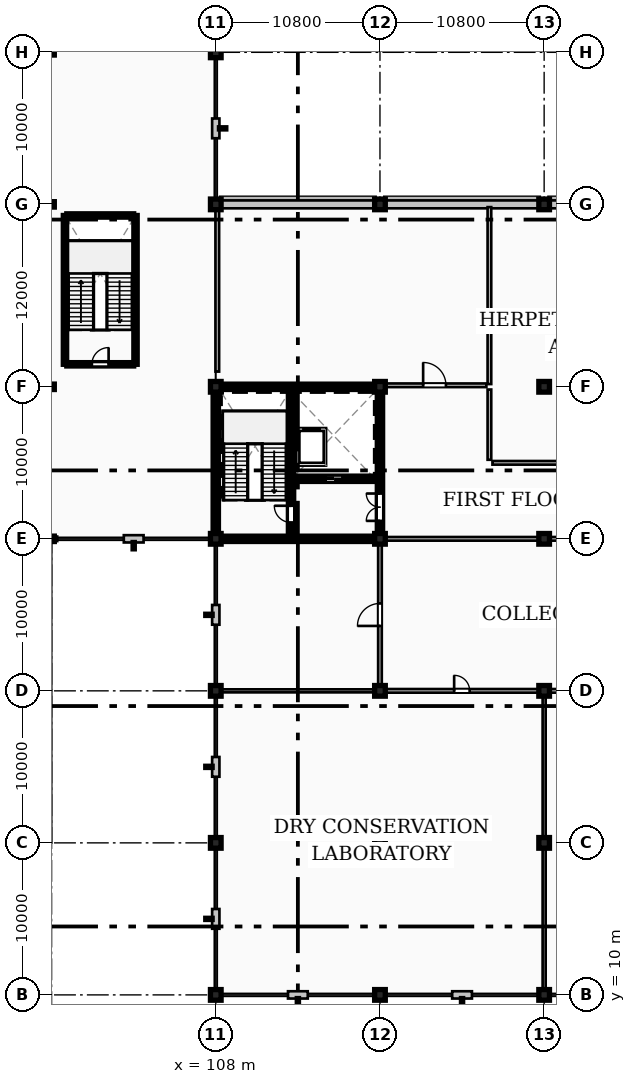
"""IFC4 building model, lengths in metres.
Left out: names, types, materials, properties, quantities, classifications, styles, units other than length and angle.
Written with IfcOpenShell. Run it as: python <this file> out.ifc"""

import sys

from ifc_helpers import new_model, si_unit, direction, frame, frame_2d, origin, origin_2d, place, context, subcontext, project, spatial, rectangle, hollow_circle, extrude, element, fill, save


model = new_model("IFC4")
c1 = context("Model", 3, precision=1e-05, world=origin(), true_north=direction((0.0, 1.0)))
c2 = subcontext(c1, "Body", "Model", "MODEL_VIEW")
j1 = project(units=[si_unit("LENGTHUNIT", "METRE"), si_unit("PLANEANGLEUNIT", "RADIAN")], contexts=[c1])
p1 = place(None, origin())
s1 = spatial("IfcSite", under=j1, at=p1, CompositionType="ELEMENT")
p2 = place(p1, origin())
s2 = spatial("IfcBuilding", under=s1, at=p2, CompositionType="ELEMENT")
p3 = place(p2, frame((0.0, 0.0, 4.8)))
s3 = spatial("IfcBuildingStorey", under=s2, at=p3, CompositionType="ELEMENT", Elevation=4.8)
for number, where, z_axis, x_axis in (
    (1, (97.2, 40.0, 0.0), (0.0, 0.0, 1.0), (1.0, 0.0, 0.0)),
    (2, (97.2, 50.0, 0.0), (0.0, 0.0, 1.0), (1.0, 0.0, 0.0)),
    (3, (97.2, 62.0, 0.0), (0.0, 0.0, 1.0), (1.0, 0.0, 0.0)),
    (4, (97.2, 72.0, 0.0), (0.0, 0.0, 1.0), (1.0, 0.0, 0.0)),
):
    element("IfcColumn", number, at=place(p3, frame(where, z_axis=z_axis, x_axis=x_axis)), inside=s3, PredefinedType="COLUMN", context=c2, shape_type="SweptSolid", body=[
        extrude(hollow_circle(Radius=0.178, WallThickness=0.016, at=origin_2d()), origin(), (0.0, 0.0, 1.0), 4.8),
    ])
for number, where, z_axis, x_axis in (
    (5, (108.0, 10.0, 0.0), (0.0, 0.0, 1.0), (1.0, 0.0, 0.0)),
    (6, (108.0, 20.0, 0.0), (0.0, 0.0, 1.0), (1.0, 0.0, 0.0)),
    (7, (108.0, 30.0, 0.0), (0.0, 0.0, 1.0), (1.0, 0.0, 0.0)),
    (8, (108.0, 40.0, 0.0), (0.0, 0.0, 1.0), (1.0, 0.0, 0.0)),
    (9, (108.0, 50.0, 0.0), (0.0, 0.0, 1.0), (1.0, 0.0, 0.0)),
    (10, (108.0, 62.0, 0.0), (0.0, 0.0, 1.0), (1.0, 0.0, 0.0)),
    (11, (108.0, 72.0, 0.0), (0.0, 0.0, 1.0), (1.0, 0.0, 0.0)),
    (12, (118.8, 10.0, 0.0), (0.0, 0.0, 1.0), (1.0, 0.0, 0.0)),
    (13, (118.8, 20.0, 0.0), (0.0, 0.0, 1.0), (1.0, 0.0, 0.0)),
    (14, (118.8, 30.0, 0.0), (0.0, 0.0, 1.0), (1.0, 0.0, 0.0)),
    (15, (118.8, 40.0, 0.0), (0.0, 0.0, 1.0), (1.0, 0.0, 0.0)),
    (16, (118.8, 50.0, 0.0), (0.0, 0.0, 1.0), (1.0, 0.0, 0.0)),
    (17, (118.8, 62.0, 0.0), (0.0, 0.0, 1.0), (1.0, 0.0, 0.0)),
    (18, (129.6, 10.0, 0.0), (0.0, 0.0, 1.0), (1.0, 0.0, 0.0)),
    (19, (129.6, 20.0, 0.0), (0.0, 0.0, 1.0), (1.0, 0.0, 0.0)),
    (20, (129.6, 30.0, 0.0), (0.0, 0.0, 1.0), (1.0, 0.0, 0.0)),
    (21, (129.6, 40.0, 0.0), (0.0, 0.0, 1.0), (1.0, 0.0, 0.0)),
    (22, (129.6, 50.0, 0.0), (0.0, 0.0, 1.0), (1.0, 0.0, 0.0)),
    (23, (129.6, 62.0, 0.0), (0.0, 0.0, 1.0), (1.0, 0.0, 0.0)),
):
    element("IfcColumn", number, at=place(p3, frame(where, z_axis=z_axis, x_axis=x_axis)), inside=s3, PredefinedType="COLUMN", context=c2, shape_type="SweptSolid", body=[
        extrude(rectangle(XDim=0.7, YDim=0.7, at=origin_2d()), origin(), (0.0, 0.0, 1.0), 4.8),
    ])
p4 = place(p3, frame((101.95, 40.0, 0.0), z_axis=(0.0, 0.0, 1.0), x_axis=(1.0, 0.0, 0.0)))
e24 = element("IfcWall", 24, at=p4, inside=s3, PredefinedType="STANDARD", context=c2, shape_type="SweptSolid", body=[
    extrude(rectangle(XDim=1.3, YDim=0.48, at=frame_2d((0.65, 0.0))), origin(), (0.0, 0.0, 1.0), 4.06),
])
for number, where, z_axis, x_axis in (
    (25, (97.345, 40.0, 0.0), (0.0, 0.0, 1.0), (1.0, 0.0, 0.0)),
    (26, (107.63, 40.0, 0.0), (0.0, 0.0, 1.0), (1.0, 0.0, 0.0)),
):
    element("IfcWall", number, at=place(p3, frame(where, z_axis=z_axis, x_axis=x_axis)), inside=s3, PredefinedType="STANDARD", context=c2, shape_type="SweptSolid", body=[
        extrude(rectangle(XDim=0.225, YDim=0.3, at=frame_2d((0.113, 0.0))), origin(), (0.0, 0.0, 1.0), 4.56),
    ])
p5 = place(p3, frame((108.0, 35.65, 0.0), z_axis=(0.0, 0.0, 1.0), x_axis=(0.0, -1.0, 0.0)))
e27 = element("IfcWall", 27, at=p5, inside=s3, PredefinedType="STANDARD", context=c2, shape_type="SweptSolid", body=[
    extrude(rectangle(XDim=1.3, YDim=0.48, at=frame_2d((0.65, 0.0))), origin(), (0.0, 0.0, 1.0), 4.56),
])
for number, where, z_axis, x_axis in (
    (28, (108.0, 39.855, 0.0), (0.0, 0.0, 1.0), (0.0, -1.0, 0.0)),
    (29, (108.0, 30.37, 0.0), (0.0, 0.0, 1.0), (0.0, -1.0, 0.0)),
):
    element("IfcWall", number, at=place(p3, frame(where, z_axis=z_axis, x_axis=x_axis)), inside=s3, PredefinedType="STANDARD", context=c2, shape_type="SweptSolid", body=[
        extrude(rectangle(XDim=0.225, YDim=0.3, at=frame_2d((0.113, 0.0))), origin(), (0.0, 0.0, 1.0), 4.56),
    ])
p6 = place(p3, frame((108.0, 25.65, 0.0), z_axis=(0.0, 0.0, 1.0), x_axis=(0.0, -1.0, 0.0)))
e30 = element("IfcWall", 30, at=p6, inside=s3, PredefinedType="STANDARD", context=c2, shape_type="SweptSolid", body=[
    extrude(rectangle(XDim=1.3, YDim=0.48, at=frame_2d((0.65, 0.0))), origin(), (0.0, 0.0, 1.0), 4.56),
])
for number, where, z_axis, x_axis in (
    (31, (108.0, 29.855, 0.0), (0.0, 0.0, 1.0), (0.0, -1.0, 0.0)),
    (32, (108.0, 20.37, 0.0), (0.0, 0.0, 1.0), (0.0, -1.0, 0.0)),
):
    element("IfcWall", number, at=place(p3, frame(where, z_axis=z_axis, x_axis=x_axis)), inside=s3, PredefinedType="STANDARD", context=c2, shape_type="SweptSolid", body=[
        extrude(rectangle(XDim=0.225, YDim=0.3, at=frame_2d((0.113, 0.0))), origin(), (0.0, 0.0, 1.0), 4.56),
    ])
p7 = place(p3, frame((108.0, 15.65, 0.0), z_axis=(0.0, 0.0, 1.0), x_axis=(0.0, -1.0, 0.0)))
e33 = element("IfcWall", 33, at=p7, inside=s3, PredefinedType="STANDARD", context=c2, shape_type="SweptSolid", body=[
    extrude(rectangle(XDim=1.3, YDim=0.48, at=frame_2d((0.65, 0.0))), origin(), (0.0, 0.0, 1.0), 4.13),
])
for number, where, z_axis, x_axis in (
    (34, (108.0, 19.855, 0.0), (0.0, 0.0, 1.0), (0.0, -1.0, 0.0)),
    (35, (108.0, 10.37, 0.0), (0.0, 0.0, 1.0), (0.0, -1.0, 0.0)),
):
    element("IfcWall", number, at=place(p3, frame(where, z_axis=z_axis, x_axis=x_axis)), inside=s3, PredefinedType="STANDARD", context=c2, shape_type="SweptSolid", body=[
        extrude(rectangle(XDim=0.225, YDim=0.3, at=frame_2d((0.113, 0.0))), origin(), (0.0, 0.0, 1.0), 4.56),
    ])
p8 = place(p3, frame((112.75, 10.0, 0.0), z_axis=(0.0, 0.0, 1.0), x_axis=(1.0, 0.0, 0.0)))
e36 = element("IfcWall", 36, at=p8, inside=s3, PredefinedType="STANDARD", context=c2, shape_type="SweptSolid", body=[
    extrude(rectangle(XDim=1.3, YDim=0.48, at=frame_2d((0.65, 0.0))), origin(), (0.0, 0.0, 1.0), 4.13),
])
for number, where, z_axis, x_axis in (
    (37, (108.145, 10.0, 0.0), (0.0, 0.0, 1.0), (1.0, 0.0, 0.0)),
    (38, (118.43, 10.0, 0.0), (0.0, 0.0, 1.0), (1.0, 0.0, 0.0)),
):
    element("IfcWall", number, at=place(p3, frame(where, z_axis=z_axis, x_axis=x_axis)), inside=s3, PredefinedType="STANDARD", context=c2, shape_type="SweptSolid", body=[
        extrude(rectangle(XDim=0.225, YDim=0.3, at=frame_2d((0.113, 0.0))), origin(), (0.0, 0.0, 1.0), 4.56),
    ])
p9 = place(p3, frame((123.55, 10.0, 0.0), z_axis=(0.0, 0.0, 1.0), x_axis=(1.0, 0.0, 0.0)))
e39 = element("IfcWall", 39, at=p9, inside=s3, PredefinedType="STANDARD", context=c2, shape_type="SweptSolid", body=[
    extrude(rectangle(XDim=1.3, YDim=0.48, at=frame_2d((0.65, 0.0))), origin(), (0.0, 0.0, 1.0), 4.13),
])
p10 = place(p3, frame((118.945, 10.0, 0.0), z_axis=(0.0, 0.0, 1.0), x_axis=(1.0, 0.0, 0.0)))
e40 = element("IfcWall", 40, at=p10, inside=s3, PredefinedType="STANDARD", context=c2, shape_type="SweptSolid", body=[
    extrude(rectangle(XDim=0.225, YDim=0.3, at=frame_2d((0.112, 0.0))), origin(), (0.0, 0.0, 1.0), 4.56),
])
p11 = place(p3, frame((129.23, 10.0, 0.0), z_axis=(0.0, 0.0, 1.0), x_axis=(1.0, 0.0, 0.0)))
e41 = element("IfcWall", 41, at=p11, inside=s3, PredefinedType="STANDARD", context=c2, shape_type="SweptSolid", body=[
    extrude(rectangle(XDim=0.225, YDim=0.3, at=frame_2d((0.113, 0.0))), origin(), (0.0, 0.0, 1.0), 4.56),
])
p12 = place(p3, frame((129.745, 10.0, 0.0), z_axis=(0.0, 0.0, 1.0), x_axis=(1.0, 0.0, 0.0)))
e42 = element("IfcWall", 42, at=p12, inside=s3, PredefinedType="STANDARD", context=c2, shape_type="SweptSolid", body=[
    extrude(rectangle(XDim=0.225, YDim=0.3, at=frame_2d((0.112, 0.0))), origin(), (0.0, 0.0, 1.0), 4.56),
])
p13 = place(p3, frame((140.255, 62.0, 0.0), z_axis=(0.0, 0.0, 1.0), x_axis=(-1.0, 0.0, 0.0)))
e43 = element("IfcWall", 43, at=p13, inside=s3, PredefinedType="SOLIDWALL", context=c2, shape_type="SweptSolid", body=[
    extrude(rectangle(XDim=10.51, YDim=0.52, at=frame_2d((5.255, 0.0))), origin(), (0.0, 0.0, 1.0), 3.83),
])
for number, where, z_axis, x_axis in (
    (44, (129.455, 62.0, 0.0), (0.0, 0.0, 1.0), (-1.0, 0.0, 0.0)),
    (45, (118.655, 62.0, 0.0), (0.0, 0.0, 1.0), (-1.0, 0.0, 0.0)),
):
    element("IfcWall", number, at=place(p3, frame(where, z_axis=z_axis, x_axis=x_axis)), inside=s3, PredefinedType="SOLIDWALL", context=c2, shape_type="SweptSolid", body=[
        extrude(rectangle(XDim=10.51, YDim=0.52, at=frame_2d((5.255, 0.0))), origin(), (0.0, 0.0, 1.0), 3.83),
    ])
p14 = place(p3, frame((108.0, 66.35, 0.0), z_axis=(0.0, 0.0, 1.0), x_axis=(0.0, 1.0, 0.0)))
e46 = element("IfcWall", 46, at=p14, inside=s3, PredefinedType="STANDARD", context=c2, shape_type="SweptSolid", body=[
    extrude(rectangle(XDim=1.3, YDim=0.48, at=frame_2d((0.65, 0.0))), origin(), (0.0, 0.0, 1.0), 4.56),
])
for number, where, z_axis, x_axis in (
    (47, (108.0, 62.145, 0.0), (0.0, 0.0, 1.0), (0.0, 1.0, 0.0)),
    (48, (108.0, 71.63, 0.0), (0.0, 0.0, 1.0), (0.0, 1.0, 0.0)),
):
    element("IfcWall", number, at=place(p3, frame(where, z_axis=z_axis, x_axis=x_axis)), inside=s3, PredefinedType="STANDARD", context=c2, shape_type="SweptSolid", body=[
        extrude(rectangle(XDim=0.225, YDim=0.3, at=frame_2d((0.113, 0.0))), origin(), (0.0, 0.0, 1.0), 4.56),
    ])
for number, where, z_axis, x_axis in (
    (49, (108.35, 40.0, 0.0), (0.0, 0.0, 1.0), (1.0, 0.0, 0.0)),
    (50, (108.35, 50.0, 0.0), (0.0, 0.0, 1.0), (1.0, 0.0, 0.0)),
):
    element("IfcWall", number, at=place(p3, frame(where, z_axis=z_axis, x_axis=x_axis)), inside=s3, PredefinedType="SHEAR", context=c2, shape_type="SweptSolid", body=[
        extrude(rectangle(XDim=10.1, YDim=0.35, at=frame_2d((5.05, 0.0))), origin(), (0.0, 0.0, 1.0), 4.56),
    ])
p15 = place(p3, frame((108.0, 40.35, 0.0), z_axis=(0.0, 0.0, 1.0), x_axis=(0.0, 1.0, 0.0)))
e51 = element("IfcWall", 51, at=p15, inside=s3, PredefinedType="SHEAR", context=c2, shape_type="SweptSolid", body=[
    extrude(rectangle(XDim=9.3, YDim=0.35, at=frame_2d((4.65, 0.0))), origin(), (0.0, 0.0, 1.0), 4.56),
])
p16 = place(p3, frame((118.8, 40.35, 0.0), z_axis=(0.0, 0.0, 1.0), x_axis=(0.0, 1.0, 0.0)))
e52 = element("IfcWall", 52, at=p16, inside=s3, PredefinedType="SHEAR", context=c2, shape_type="SweptSolid", body=[
    extrude(rectangle(XDim=9.3, YDim=0.35, at=frame_2d((4.65, 0.0))), origin(), (0.0, 0.0, 1.0), 4.56),
])
p17 = place(p16, frame((0.83, 0.0, 0.0)))
e53 = element("IfcOpeningElement", 53, at=p17, cuts=e52, PredefinedType="OPENING", context=c2, shape_type="SweptSolid", body=[
    extrude(rectangle(XDim=1.8, YDim=2.25, at=frame_2d((0.9, 1.125))), frame((0.0, 0.185, 0.0), z_axis=(0.0, -1.0, 0.0), x_axis=(1.0, 0.0, 0.0)), (0.0, 0.0, 1.0), 0.37),
])
p18 = place(p3, frame((112.95, 40.175, 0.0), z_axis=(0.0, 0.0, 1.0), x_axis=(0.0, 1.0, 0.0)))
e54 = element("IfcWall", 54, at=p18, inside=s3, PredefinedType="SHEAR", context=c2, shape_type="SweptSolid", body=[
    extrude(rectangle(XDim=9.65, YDim=0.35, at=frame_2d((4.825, 0.0))), origin(), (0.0, 0.0, 1.0), 4.56),
])
p19 = place(p18, frame((0.9, 0.0, 0.0)))
e55 = element("IfcOpeningElement", 55, at=p19, cuts=e54, PredefinedType="OPENING", context=c2, shape_type="SweptSolid", body=[
    extrude(rectangle(XDim=1.1, YDim=2.2, at=frame_2d((0.55, 1.1))), frame((0.0, 0.185, 0.0), z_axis=(0.0, -1.0, 0.0), x_axis=(1.0, 0.0, 0.0)), (0.0, 0.0, 1.0), 0.37),
])
p20 = place(p3, frame((113.13, 43.95, 0.0), z_axis=(0.0, 0.0, 1.0), x_axis=(1.0, 0.0, 0.0)))
e56 = element("IfcWall", 56, at=p20, inside=s3, PredefinedType="SHEAR", context=c2, shape_type="SweptSolid", body=[
    extrude(rectangle(XDim=5.49, YDim=0.35, at=frame_2d((2.745, 0.0))), origin(), (0.0, 0.0, 1.0), 4.56),
])
p21 = place(p20, frame((2.1, 0.0, 0.0)))
e57 = element("IfcOpeningElement", 57, at=p21, cuts=e56, PredefinedType="OPENING", context=c2, shape_type="SweptSolid", body=[
    extrude(rectangle(XDim=1.1, YDim=2.2, at=frame_2d((0.55, 1.1))), frame((0.0, 0.185, 0.0), z_axis=(0.0, -1.0, 0.0), x_axis=(1.0, 0.0, 0.0)), (0.0, 0.0, 1.0), 0.37),
])
for number, where, z_axis, x_axis in (
    (58, (98.08, 51.48, 0.0), (0.0, 0.0, 1.0), (0.0, 1.0, 0.0)),
    (59, (102.72, 51.48, 0.0), (0.0, 0.0, 1.0), (0.0, 1.0, 0.0)),
):
    element("IfcWall", number, at=place(p3, frame(where, z_axis=z_axis, x_axis=x_axis)), inside=s3, PredefinedType="SHEAR", context=c2, shape_type="SweptSolid", body=[
        extrude(rectangle(XDim=9.79, YDim=0.22, at=frame_2d((4.895, 0.0))), origin(), (0.0, 0.0, 1.0), 4.56),
    ])
p22 = place(p3, frame((98.2, 61.27, 0.0), z_axis=(0.0, 0.0, 1.0), x_axis=(1.0, 0.0, 0.0)))
e60 = element("IfcWall", 60, at=p22, inside=s3, PredefinedType="SHEAR", context=c2, shape_type="SweptSolid", body=[
    extrude(rectangle(XDim=4.4, YDim=0.22, at=frame_2d((2.2, 0.0))), origin(), (0.0, 0.0, 1.0), 4.56),
])
p23 = place(p3, frame((98.2, 51.48, 0.0), z_axis=(0.0, 0.0, 1.0), x_axis=(1.0, 0.0, 0.0)))
e61 = element("IfcWall", 61, at=p23, inside=s3, PredefinedType="SHEAR", context=c2, shape_type="SweptSolid", body=[
    extrude(rectangle(XDim=4.4, YDim=0.22, at=frame_2d((2.2, 0.0))), origin(), (0.0, 0.0, 1.0), 4.56),
])
p24 = place(p23, frame((1.65, 0.0, 0.0)))
e62 = element("IfcOpeningElement", 62, at=p24, cuts=e61, PredefinedType="OPENING", context=c2, shape_type="SweptSolid", body=[
    extrude(rectangle(XDim=1.1, YDim=2.2, at=frame_2d((0.55, 1.1))), frame((0.0, 0.12, 0.0), z_axis=(0.0, -1.0, 0.0), x_axis=(1.0, 0.0, 0.0)), (0.0, 0.0, 1.0), 0.24),
])
p25 = place(p3, frame((118.98, 30.0, 0.0), z_axis=(0.0, 0.0, 1.0), x_axis=(1.0, 0.0, 0.0)))
e63 = element("IfcWall", 63, at=p25, inside=s3, PredefinedType="SOLIDWALL", context=c2, shape_type="SweptSolid", body=[
    extrude(rectangle(XDim=10.42, YDim=0.24, at=frame_2d((5.21, 0.0))), origin(), (0.0, 0.0, 1.0), 3.83),
])
p26 = place(p25, frame((4.7, 0.0, 0.0)))
e64 = element("IfcOpeningElement", 64, at=p26, cuts=e63, PredefinedType="OPENING", context=c2, shape_type="SweptSolid", body=[
    extrude(rectangle(XDim=1.02, YDim=2.2, at=frame_2d((0.51, 1.1))), frame((0.0, 0.13, 0.0), z_axis=(0.0, -1.0, 0.0), x_axis=(1.0, 0.0, 0.0)), (0.0, 0.0, 1.0), 0.26),
])
p27 = place(p3, frame((129.8, 30.0, 0.0), z_axis=(0.0, 0.0, 1.0), x_axis=(1.0, 0.0, 0.0)))
e65 = element("IfcWall", 65, at=p27, inside=s3, PredefinedType="SOLIDWALL", context=c2, shape_type="SweptSolid", body=[
    extrude(rectangle(XDim=10.4, YDim=0.24, at=frame_2d((5.2, 0.0))), origin(), (0.0, 0.0, 1.0), 3.83),
])
p28 = place(p3, frame((118.98, 40.0, 0.0), z_axis=(0.0, 0.0, 1.0), x_axis=(1.0, 0.0, 0.0)))
e66 = element("IfcWall", 66, at=p28, inside=s3, PredefinedType="SOLIDWALL", context=c2, shape_type="SweptSolid", body=[
    extrude(rectangle(XDim=10.42, YDim=0.24, at=frame_2d((5.21, 0.0))), origin(), (0.0, 0.0, 1.0), 3.83),
])
p29 = place(p3, frame((129.8, 40.0, 0.0), z_axis=(0.0, 0.0, 1.0), x_axis=(1.0, 0.0, 0.0)))
e67 = element("IfcWall", 67, at=p29, inside=s3, PredefinedType="SOLIDWALL", context=c2, shape_type="SweptSolid", body=[
    extrude(rectangle(XDim=10.4, YDim=0.24, at=frame_2d((5.2, 0.0))), origin(), (0.0, 0.0, 1.0), 3.83),
])
p30 = place(p3, frame((126.2, 45.0, 0.0), z_axis=(0.0, 0.0, 1.0), x_axis=(1.0, 0.0, 0.0)))
e68 = element("IfcWall", 68, at=p30, inside=s3, PredefinedType="SOLIDWALL", context=c2, shape_type="SweptSolid", body=[
    extrude(rectangle(XDim=24.82, YDim=0.24, at=frame_2d((12.41, 0.0))), origin(), (0.0, 0.0, 1.0), 4.52),
])
p31 = place(p30, frame((11.66, 0.0, 0.0)))
e69 = element("IfcOpeningElement", 69, at=p31, cuts=e68, PredefinedType="OPENING", context=c2, shape_type="SweptSolid", body=[
    extrude(rectangle(XDim=1.5, YDim=2.4, at=frame_2d((0.75, 1.2))), frame((0.0, 0.13, 0.0), z_axis=(0.0, -1.0, 0.0), x_axis=(1.0, 0.0, 0.0)), (0.0, 0.0, 1.0), 0.26),
])
p32 = place(p3, frame((118.98, 50.1, 0.0), z_axis=(0.0, 0.0, 1.0), x_axis=(1.0, 0.0, 0.0)))
e70 = element("IfcWall", 70, at=p32, inside=s3, PredefinedType="SOLIDWALL", context=c2, shape_type="SweptSolid", body=[
    extrude(rectangle(XDim=6.82, YDim=0.24, at=frame_2d((3.41, 0.0))), origin(), (0.0, 0.0, 1.0), 3.83),
])
p33 = place(p32, frame((2.66, 0.0, 0.0)))
e71 = element("IfcOpeningElement", 71, at=p33, cuts=e70, PredefinedType="OPENING", context=c2, shape_type="SweptSolid", body=[
    extrude(rectangle(XDim=1.5, YDim=2.4, at=frame_2d((0.75, 1.2))), frame((0.0, 0.13, 0.0), z_axis=(0.0, -1.0, 0.0), x_axis=(1.0, 0.0, 0.0)), (0.0, 0.0, 1.0), 0.26),
])
p34 = place(p3, frame((118.8, 30.2, 0.0), z_axis=(0.0, 0.0, 1.0), x_axis=(0.0, 1.0, 0.0)))
e72 = element("IfcWall", 72, at=p34, inside=s3, PredefinedType="SOLIDWALL", context=c2, shape_type="SweptSolid", body=[
    extrude(rectangle(XDim=9.62, YDim=0.24, at=frame_2d((4.81, 0.0))), origin(), (0.0, 0.0, 1.0), 3.969),
])
p35 = place(p34, frame((4.07, 0.0, 0.0)))
e73 = element("IfcOpeningElement", 73, at=p35, cuts=e72, PredefinedType="OPENING", context=c2, shape_type="SweptSolid", body=[
    extrude(rectangle(XDim=1.48, YDim=2.42, at=frame_2d((0.74, 1.21))), frame((0.0, 0.13, 0.0), z_axis=(0.0, -1.0, 0.0), x_axis=(1.0, 0.0, 0.0)), (0.0, 0.0, 1.0), 0.26),
])
p36 = place(p3, frame((108.18, 30.0, 0.0), z_axis=(0.0, 0.0, 1.0), x_axis=(1.0, 0.0, 0.0)))
e74 = element("IfcWall", 74, at=p36, inside=s3, PredefinedType="SOLIDWALL", context=c2, shape_type="SweptSolid", body=[
    extrude(rectangle(XDim=10.44, YDim=0.2, at=frame_2d((5.22, 0.0))), origin(), (0.0, 0.0, 1.0), 3.83),
])
p37 = place(p3, frame((108.1, 51.0, 0.0), z_axis=(0.0, 0.0, 1.0), x_axis=(0.0, 1.0, 0.0)))
e75 = element("IfcWall", 75, at=p37, inside=s3, PredefinedType="SOLIDWALL", context=c2, shape_type="SweptSolid", body=[
    extrude(rectangle(XDim=10.82, YDim=0.24, at=frame_2d((5.41, 0.0))), origin(), (0.0, 0.0, 1.0), 3.919),
])
p38 = place(p3, frame((126.0, 45.2, 0.0), z_axis=(0.0, 0.0, 1.0), x_axis=(0.0, 1.0, 0.0)))
e76 = element("IfcWall", 76, at=p38, inside=s3, PredefinedType="SOLIDWALL", context=c2, shape_type="SweptSolid", body=[
    extrude(rectangle(XDim=4.62, YDim=0.24, at=frame_2d((2.31, 0.0))), origin(), (0.0, 0.0, 1.0), 4.069),
])
p39 = place(p3, frame((126.0, 50.18, 0.0), z_axis=(0.0, 0.0, 1.0), x_axis=(0.0, 1.0, 0.0)))
e77 = element("IfcWall", 77, at=p39, inside=s3, PredefinedType="SOLIDWALL", context=c2, shape_type="SweptSolid", body=[
    extrude(rectangle(XDim=11.64, YDim=0.24, at=frame_2d((5.82, 0.0))), origin(), (0.0, 0.0, 1.0), 4.069),
])
p40 = place(p3, frame((129.6, 10.18, 0.0), z_axis=(0.0, 0.0, 1.0), x_axis=(0.0, 1.0, 0.0)))
e78 = element("IfcWall", 78, at=p40, inside=s3, PredefinedType="SOLIDWALL", context=c2, shape_type="SweptSolid", body=[
    extrude(rectangle(XDim=9.62, YDim=0.2, at=frame_2d((4.81, 0.0))), origin(), (0.0, 0.0, 1.0), 4.13),
])
p41 = place(p3, frame((129.6, 20.2, 0.0), z_axis=(0.0, 0.0, 1.0), x_axis=(0.0, 1.0, 0.0)))
e79 = element("IfcWall", 79, at=p41, inside=s3, PredefinedType="SOLIDWALL", context=c2, shape_type="SweptSolid", body=[
    extrude(rectangle(XDim=9.6, YDim=0.2, at=frame_2d((4.8, 0.0))), origin(), (0.0, 0.0, 1.0), 3.969),
])
p42 = place(p19, origin())
e80 = element("IfcDoor", 80, at=p42, inside=s3, OperationType="SINGLE_SWING_RIGHT", PredefinedType="DOOR", context=c2, shape_type="SweptSolid", body=[
    extrude(rectangle(XDim=1.1, YDim=2.2, at=frame_2d((0.55, 1.1))), frame((0.0, 0.025, 0.0), z_axis=(0.0, -1.0, 0.0), x_axis=(1.0, 0.0, 0.0)), (0.0, 0.0, 1.0), 0.05),
])
fill(e55, e80)
p43 = place(p17, origin())
e81 = element("IfcDoor", 81, at=p43, inside=s3, OperationType="DOUBLE_DOOR_SINGLE_SWING", PredefinedType="DOOR", context=c2, shape_type="SweptSolid", body=[
    extrude(rectangle(XDim=1.8, YDim=2.25, at=frame_2d((0.9, 1.125))), frame((0.0, 0.025, 0.0), z_axis=(0.0, -1.0, 0.0), x_axis=(1.0, 0.0, 0.0)), (0.0, 0.0, 1.0), 0.05),
])
fill(e53, e81)
p44 = place(p21, origin())
e82 = element("IfcDoor", 82, at=p44, inside=s3, OperationType="DOUBLE_DOOR_SLIDING", PredefinedType="DOOR", context=c2, shape_type="SweptSolid", body=[
    extrude(rectangle(XDim=1.1, YDim=2.2, at=frame_2d((0.55, 1.1))), frame((0.0, 0.025, 0.0), z_axis=(0.0, -1.0, 0.0), x_axis=(1.0, 0.0, 0.0)), (0.0, 0.0, 1.0), 0.05),
])
fill(e57, e82)
p45 = place(p24, origin())
e83 = element("IfcDoor", 83, at=p45, inside=s3, OperationType="SINGLE_SWING_RIGHT", PredefinedType="DOOR", context=c2, shape_type="SweptSolid", body=[
    extrude(rectangle(XDim=1.1, YDim=2.2, at=frame_2d((0.55, 1.1))), frame((0.0, 0.025, 0.0), z_axis=(0.0, -1.0, 0.0), x_axis=(1.0, 0.0, 0.0)), (0.0, 0.0, 1.0), 0.05),
])
fill(e62, e83)
p46 = place(p26, origin())
e84 = element("IfcDoor", 84, at=p46, inside=s3, OperationType="SINGLE_SWING_LEFT", PredefinedType="DOOR", context=c2, shape_type="SweptSolid", body=[
    extrude(rectangle(XDim=1.02, YDim=2.2, at=frame_2d((0.51, 1.1))), frame((0.0, 0.025, 0.0), z_axis=(0.0, -1.0, 0.0), x_axis=(1.0, 0.0, 0.0)), (0.0, 0.0, 1.0), 0.05),
])
fill(e64, e84)
p47 = place(p33, origin())
e85 = element("IfcDoor", 85, at=p47, inside=s3, OperationType="SINGLE_SWING_LEFT", PredefinedType="DOOR", context=c2, shape_type="SweptSolid", body=[
    extrude(rectangle(XDim=1.5, YDim=2.4, at=frame_2d((0.75, 1.2))), frame((0.0, 0.025, 0.0), z_axis=(0.0, -1.0, 0.0), x_axis=(1.0, 0.0, 0.0)), (0.0, 0.0, 1.0), 0.05),
])
fill(e71, e85)
p48 = place(p35, origin())
e86 = element("IfcDoor", 86, at=p48, inside=s3, OperationType="SINGLE_SWING_LEFT", PredefinedType="DOOR", context=c2, shape_type="SweptSolid", body=[
    extrude(rectangle(XDim=1.48, YDim=2.42, at=frame_2d((0.74, 1.21))), frame((0.0, 0.025, 0.0), z_axis=(0.0, -1.0, 0.0), x_axis=(1.0, 0.0, 0.0)), (0.0, 0.0, 1.0), 0.05),
])
fill(e73, e86)
save(model, sys.argv[1])
